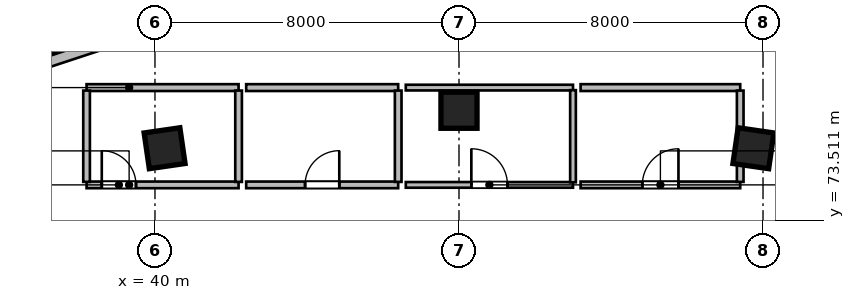
"""IFC4 building model, lengths in metres.
Left out: names, types, materials, properties, quantities, classifications, styles, units other than length and angle.
Written with IfcOpenShell. Run it as: python <this file> out.ifc"""

import sys

from ifc_helpers import new_model, si_unit, direction, frame, frame_2d, origin, origin_2d, place, context, subcontext, project, spatial, rectangle, extrude, source, transform, mapped, element, fill, save


model = new_model("IFC4")
c1 = context("Model", 3, precision=1e-05, world=origin(), true_north=direction((0.0, 1.0)))
c2 = subcontext(c1, "Body", "Model", "MODEL_VIEW")
j1 = project(units=[si_unit("LENGTHUNIT", "METRE"), si_unit("PLANEANGLEUNIT", "RADIAN")], contexts=[c1])
p1 = place(None, origin())
s1 = spatial("IfcSite", under=j1, at=p1, CompositionType="ELEMENT")
p2 = place(p1, origin())
s2 = spatial("IfcBuilding", under=s1, at=p2, CompositionType="ELEMENT")
p3 = place(p2, frame((0.0, 0.0, 250.8)))
s3 = spatial("IfcBuildingStorey", under=s2, at=p3, CompositionType="ELEMENT", Elevation=250.8)
m1 = source(origin(), c2, "Body", "SweptSolid", [
    extrude(rectangle(XDim=0.95, YDim=0.95, at=origin_2d()), origin(), (0.0, 0.0, 1.0), 3.9),
])
for number, where, z_axis, x_axis in (
    (1, (40.253, 75.404, 0.0), (0.0, 0.0, 1.0), (-0.143, 0.99, 0.0)),
    (2, (48.0, 76.404, 0.0), (0.0, 0.0, 1.0), (0.0, 1.0, 0.0)),
    (3, (55.747, 75.404, 0.0), (0.0, 0.0, 1.0), (0.143, 0.99, 0.0)),
):
    element("IfcColumn", number, at=place(p3, frame(where, z_axis=z_axis, x_axis=x_axis)), inside=s3, PredefinedType="COLUMN", context=c2, shape_type="MappedRepresentation", body=[
        mapped(m1, transform((0.0, 0.0, 0.0), scale=1.0)),
    ])
m2 = source(origin(), c2, "Body", "SweptSolid", [
    extrude(rectangle(XDim=3.557, YDim=0.28, at=frame_2d((1.778, 0.0))), origin(), (0.0, 0.0, 1.0), 3.58),
])
p4 = place(p3, frame((36.077, 77.307, 0.0), z_axis=(0.0, 0.0, 1.0), x_axis=(0.949687460385, 0.31319918197, 0.0)))
e4 = element("IfcWall", 4, at=p4, inside=s3, PredefinedType="SOLIDWALL", context=c2, shape_type="MappedRepresentation", body=[
    mapped(m2, transform((0.0, 0.0, 0.0), scale=1.0)),
])
m3 = source(origin(), c2, "Body", "SweptSolid", [
    extrude(rectangle(XDim=4.0, YDim=0.175, at=frame_2d((2.0, 0.0))), origin(), (0.0, 0.0, 1.0), 3.58),
])
p5 = place(p3, frame((38.2, 74.44, 0.0), z_axis=(0.0, 0.0, 1.0), x_axis=(1.0, 0.0, 0.0)))
e5 = element("IfcWall", 5, at=p5, inside=s3, PredefinedType="PARTITIONING", context=c2, shape_type="MappedRepresentation", body=[
    mapped(m3, transform((0.0, 0.0, 0.0), scale=1.0)),
])
p6 = place(p5, frame((0.4, 0.0, 0.0)))
e6 = element("IfcOpeningElement", 6, at=p6, cuts=e5, PredefinedType="OPENING", context=c2, shape_type="SweptSolid", body=[
    extrude(rectangle(XDim=0.9, YDim=2.08, at=frame_2d((0.45, 1.04))), frame((0.0, 0.098, 0.0), z_axis=(0.0, -1.0, 0.0), x_axis=(1.0, 0.0, 0.0)), (0.0, 0.0, 1.0), 0.195),
])
m4 = source(origin(), c2, "Body", "SweptSolid", [
    extrude(rectangle(XDim=4.0, YDim=0.18, at=frame_2d((2.0, 0.0))), origin(), (0.0, 0.0, 1.0), 3.58),
])
p7 = place(p3, frame((38.2, 77.0, 0.0), z_axis=(0.0, 0.0, 1.0), x_axis=(1.0, 0.0, 0.0)))
e7 = element("IfcWall", 7, at=p7, inside=s3, PredefinedType="PLUMBINGWALL", context=c2, shape_type="MappedRepresentation", body=[
    mapped(m4, transform((0.0, 0.0, 0.0), scale=1.0)),
])
m5 = source(origin(), c2, "Body", "SweptSolid", [
    extrude(rectangle(XDim=2.403, YDim=0.175, at=frame_2d((1.201, 0.0))), origin(), (0.0, 0.0, 1.0), 3.58),
])
for number, where, z_axis, x_axis in (
    (8, (38.2, 74.519, 0.0), (0.0, 0.0, 1.0), (0.0, 1.0, 0.0)),
    (9, (42.2, 74.519, 0.0), (0.0, 0.0, 1.0), (0.0, 1.0, 0.0)),
):
    element("IfcWall", number, at=place(p3, frame(where, z_axis=z_axis, x_axis=x_axis)), inside=s3, PredefinedType="PARTITIONING", context=c2, shape_type="MappedRepresentation", body=[
        mapped(m5, transform((0.0, 0.0, 0.0), scale=1.0)),
    ])
p8 = place(p3, frame((42.4, 74.44, 0.0), z_axis=(0.0, 0.0, 1.0), x_axis=(1.0, 0.0, 0.0)))
e10 = element("IfcWall", 10, at=p8, inside=s3, PredefinedType="PARTITIONING", context=c2, shape_type="MappedRepresentation", body=[
    mapped(m3, transform((0.0, 0.0, 0.0), scale=1.0)),
])
p9 = place(p8, frame((1.55, 0.0, 0.0)))
e11 = element("IfcOpeningElement", 11, at=p9, cuts=e10, PredefinedType="OPENING", context=c2, shape_type="SweptSolid", body=[
    extrude(rectangle(XDim=0.9, YDim=2.08, at=frame_2d((0.45, 1.04))), frame((0.0, 0.098, 0.0), z_axis=(0.0, -1.0, 0.0), x_axis=(1.0, 0.0, 0.0)), (0.0, 0.0, 1.0), 0.195),
])
p10 = place(p3, frame((42.4, 77.0, 0.0), z_axis=(0.0, 0.0, 1.0), x_axis=(1.0, 0.0, 0.0)))
e12 = element("IfcWall", 12, at=p10, inside=s3, PredefinedType="PLUMBINGWALL", context=c2, shape_type="MappedRepresentation", body=[
    mapped(m4, transform((0.0, 0.0, 0.0), scale=1.0)),
])
p11 = place(p3, frame((46.4, 74.519, 0.0), z_axis=(0.0, 0.0, 1.0), x_axis=(0.0, 1.0, 0.0)))
e13 = element("IfcWall", 13, at=p11, inside=s3, PredefinedType="PARTITIONING", context=c2, shape_type="MappedRepresentation", body=[
    mapped(m5, transform((0.0, 0.0, 0.0), scale=1.0)),
])
m6 = source(origin(), c2, "Body", "SweptSolid", [
    extrude(rectangle(XDim=4.4, YDim=0.15, at=frame_2d((2.2, 0.0))), origin(), (0.0, 0.0, 1.0), 3.58),
])
p12 = place(p3, frame((46.6, 74.44, 0.0), z_axis=(0.0, 0.0, 1.0), x_axis=(1.0, 0.0, 0.0)))
e14 = element("IfcWall", 14, at=p12, inside=s3, PredefinedType="PARTITIONING", context=c2, shape_type="MappedRepresentation", body=[
    mapped(m6, transform((0.0, 0.0, 0.0), scale=1.0)),
])
p13 = place(p12, frame((1.725, 0.0, 0.0)))
e15 = element("IfcOpeningElement", 15, at=p13, cuts=e14, PredefinedType="OPENING", context=c2, shape_type="SweptSolid", body=[
    extrude(rectangle(XDim=0.95, YDim=2.1, at=frame_2d((0.475, 1.05))), frame((0.0, 0.085, 0.0), z_axis=(0.0, -1.0, 0.0), x_axis=(1.0, 0.0, 0.0)), (0.0, 0.0, 1.0), 0.17),
])
p14 = place(p3, frame((46.6, 77.0, 0.0), z_axis=(0.0, 0.0, 1.0), x_axis=(1.0, 0.0, 0.0)))
e16 = element("IfcWall", 16, at=p14, inside=s3, PredefinedType="PARTITIONING", context=c2, shape_type="MappedRepresentation", body=[
    mapped(m6, transform((0.0, 0.0, 0.0), scale=1.0)),
])
m7 = source(origin(), c2, "Body", "SweptSolid", [
    extrude(rectangle(XDim=2.425, YDim=0.15, at=frame_2d((1.212, 0.0))), origin(), (0.0, 0.0, 1.0), 3.58),
])
p15 = place(p3, frame((51.0, 74.508, 0.0), z_axis=(0.0, 0.0, 1.0), x_axis=(0.0, 1.0, 0.0)))
e17 = element("IfcWall", 17, at=p15, inside=s3, PredefinedType="PARTITIONING", context=c2, shape_type="MappedRepresentation", body=[
    mapped(m7, transform((0.0, 0.0, 0.0), scale=1.0)),
])
m8 = source(origin(), c2, "Body", "SweptSolid", [
    extrude(rectangle(XDim=4.2, YDim=0.175, at=frame_2d((2.1, 0.0))), origin(), (0.0, 0.0, 1.0), 3.58),
])
p16 = place(p3, frame((51.2, 74.44, 0.0), z_axis=(0.0, 0.0, 1.0), x_axis=(1.0, 0.0, 0.0)))
e18 = element("IfcWall", 18, at=p16, inside=s3, PredefinedType="PARTITIONING", context=c2, shape_type="MappedRepresentation", body=[
    mapped(m8, transform((0.0, 0.0, 0.0), scale=1.0)),
])
p17 = place(p16, frame((1.625, 0.0, 0.0)))
e19 = element("IfcOpeningElement", 19, at=p17, cuts=e18, PredefinedType="OPENING", context=c2, shape_type="SweptSolid", body=[
    extrude(rectangle(XDim=0.95, YDim=2.12, at=frame_2d((0.475, 1.06))), frame((0.0, 0.098, 0.0), z_axis=(0.0, -1.0, 0.0), x_axis=(1.0, 0.0, 0.0)), (0.0, 0.0, 1.0), 0.195),
])
m9 = source(origin(), c2, "Body", "SweptSolid", [
    extrude(rectangle(XDim=4.2, YDim=0.18, at=frame_2d((2.1, 0.0))), origin(), (0.0, 0.0, 1.0), 3.58),
])
p18 = place(p3, frame((51.2, 77.0, 0.0), z_axis=(0.0, 0.0, 1.0), x_axis=(1.0, 0.0, 0.0)))
e20 = element("IfcWall", 20, at=p18, inside=s3, PredefinedType="PLUMBINGWALL", context=c2, shape_type="MappedRepresentation", body=[
    mapped(m9, transform((0.0, 0.0, 0.0), scale=1.0)),
])
p19 = place(p3, frame((55.4, 74.519, 0.0), z_axis=(0.0, 0.0, 1.0), x_axis=(0.0, 1.0, 0.0)))
e21 = element("IfcWall", 21, at=p19, inside=s3, PredefinedType="PARTITIONING", context=c2, shape_type="MappedRepresentation", body=[
    mapped(m5, transform((0.0, 0.0, 0.0), scale=1.0)),
])
m10 = source(origin(), c2, "Body", "SweptSolid", [
    extrude(rectangle(XDim=0.9, YDim=2.08, at=frame_2d((0.45, 1.04))), frame((0.0, 0.025, 0.0), z_axis=(0.0, -1.0, 0.0), x_axis=(1.0, 0.0, 0.0)), (0.0, 0.0, 1.0), 0.05),
])
p20 = place(p6, origin())
e22 = element("IfcDoor", 22, at=p20, inside=s3, OperationType="SINGLE_SWING_LEFT", PredefinedType="DOOR", context=c2, shape_type="MappedRepresentation", body=[
    mapped(m10, transform((0.0, 0.0, 0.0), scale=1.0)),
])
fill(e6, e22)
p21 = place(p9, origin())
e23 = element("IfcDoor", 23, at=p21, inside=s3, OperationType="SINGLE_SWING_RIGHT", PredefinedType="DOOR", context=c2, shape_type="MappedRepresentation", body=[
    mapped(m10, transform((0.0, 0.0, 0.0), scale=1.0)),
])
fill(e11, e23)
m11 = source(origin(), c2, "Body", "SweptSolid", [
    extrude(rectangle(XDim=0.95, YDim=2.1, at=frame_2d((0.475, 1.05))), frame((0.0, 0.025, 0.0), z_axis=(0.0, -1.0, 0.0), x_axis=(1.0, 0.0, 0.0)), (0.0, 0.0, 1.0), 0.05),
])
p22 = place(p13, origin())
e24 = element("IfcDoor", 24, at=p22, inside=s3, OperationType="SINGLE_SWING_LEFT", PredefinedType="DOOR", context=c2, shape_type="MappedRepresentation", body=[
    mapped(m11, transform((0.0, 0.0, 0.0), scale=1.0)),
])
fill(e15, e24)
m12 = source(origin(), c2, "Body", "SweptSolid", [
    extrude(rectangle(XDim=0.95, YDim=2.12, at=frame_2d((0.475, 1.06))), frame((0.0, 0.025, 0.0), z_axis=(0.0, -1.0, 0.0), x_axis=(1.0, 0.0, 0.0)), (0.0, 0.0, 1.0), 0.05),
])
p23 = place(p17, origin())
e25 = element("IfcDoor", 25, at=p23, inside=s3, OperationType="SINGLE_SWING_RIGHT", PredefinedType="DOOR", context=c2, shape_type="MappedRepresentation", body=[
    mapped(m12, transform((0.0, 0.0, 0.0), scale=1.0)),
])
fill(e19, e25)
save(model, sys.argv[1])
